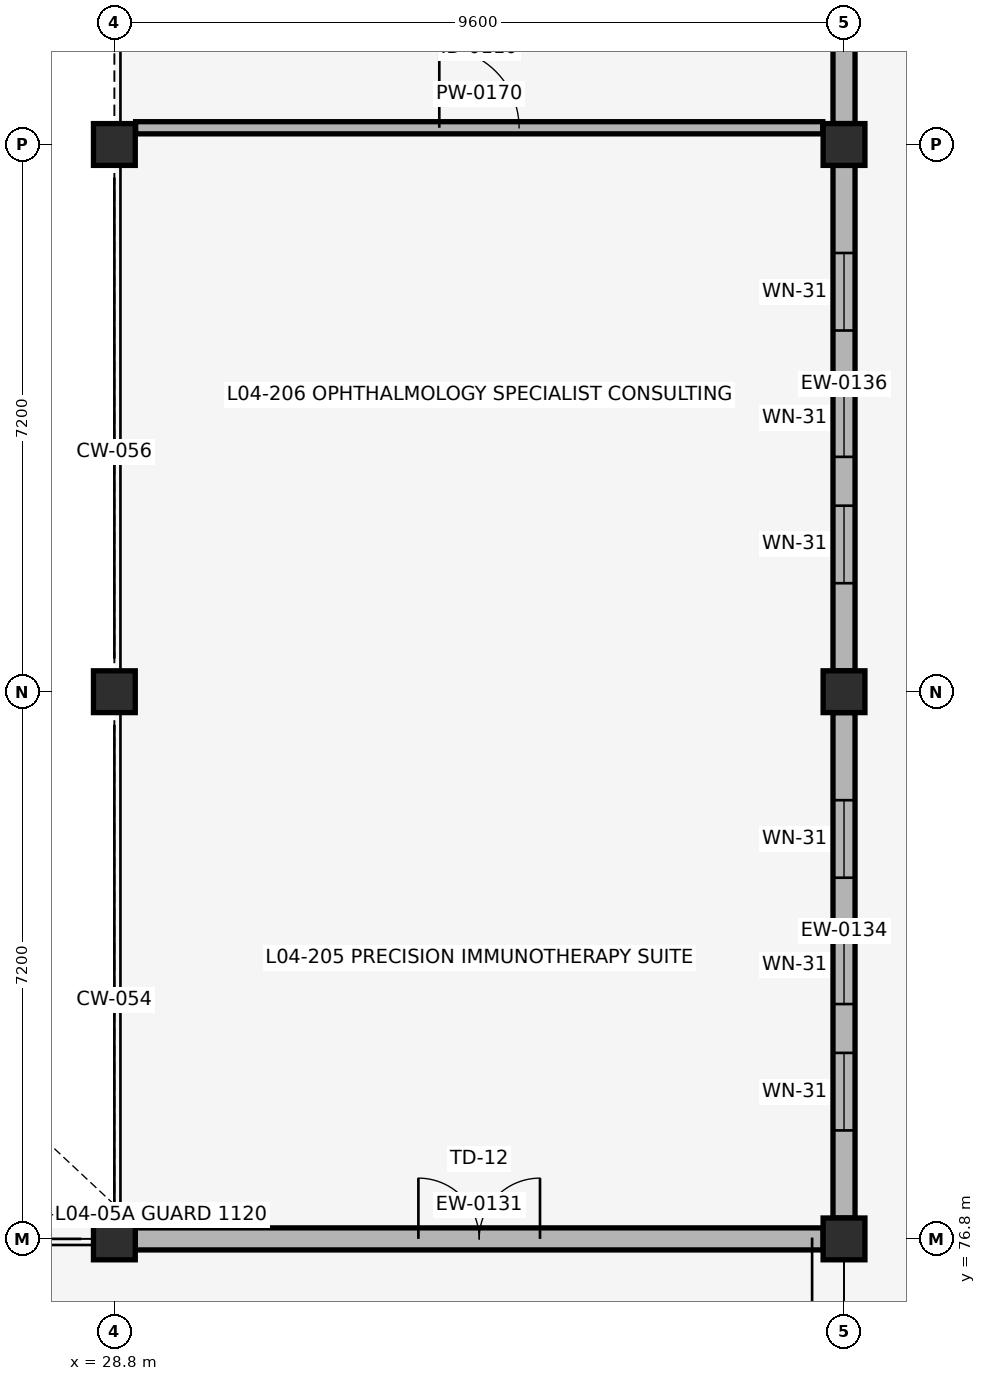
"""IFC4 building model, lengths in metres.
Left out: names, types, materials, properties, quantities, classifications, styles, units other than length and angle.
Written with IfcOpenShell. Run it as: python <this file> out.ifc"""

import sys

from ifc_helpers import new_model, si_unit, direction, frame, frame_2d, origin, origin_2d, place, context, subcontext, project, spatial, rectangle, extrude, element, fill, save


model = new_model("IFC4")
c1 = context("Model", 3, precision=1e-05, world=origin(), true_north=direction((0.0, 1.0)))
c2 = subcontext(c1, "Body", "Model", "MODEL_VIEW")
j1 = project(units=[si_unit("LENGTHUNIT", "METRE"), si_unit("PLANEANGLEUNIT", "RADIAN")], contexts=[c1])
p1 = place(None, origin())
s1 = spatial("IfcSite", under=j1, at=p1, CompositionType="ELEMENT")
p2 = place(p1, origin())
s2 = spatial("IfcBuilding", under=s1, at=p2, CompositionType="ELEMENT")
p3 = place(p2, frame((0.0, 0.0, 16.66)))
s3 = spatial("IfcBuildingStorey", under=s2, at=p3, CompositionType="ELEMENT", Elevation=16.66)
for number, where, z_axis, x_axis in (
    (1, (28.8, 76.8, 0.0), (0.0, 0.0, 1.0), (1.0, 0.0, 0.0)),
    (2, (28.8, 84.0, 0.0), (0.0, 0.0, 1.0), (1.0, 0.0, 0.0)),
    (3, (28.8, 91.2, 0.0), (0.0, 0.0, 1.0), (1.0, 0.0, 0.0)),
    (4, (38.4, 76.8, 0.0), (0.0, 0.0, 1.0), (1.0, 0.0, 0.0)),
    (5, (38.4, 84.0, 0.0), (0.0, 0.0, 1.0), (1.0, 0.0, 0.0)),
    (6, (38.4, 91.2, 0.0), (0.0, 0.0, 1.0), (1.0, 0.0, 0.0)),
):
    element("IfcColumn", number, at=place(p3, frame(where, z_axis=z_axis, x_axis=x_axis)), inside=s3, PredefinedType="COLUMN", context=c2, shape_type="SweptSolid", body=[
        extrude(rectangle(XDim=0.55, YDim=0.55, at=origin_2d()), origin(), (0.0, 0.0, 1.0), 4.08),
    ])
p4 = place(p3, frame((29.075, 76.8, 0.0), z_axis=(0.0, 0.0, 1.0), x_axis=(1.0, 0.0, 0.0)))
e7 = element("IfcWall", 7, at=p4, inside=s3, PredefinedType="SOLIDWALL", context=c2, shape_type="SweptSolid", body=[
    extrude(rectangle(XDim=9.05, YDim=0.29, at=frame_2d((4.525, 0.0))), origin(), (0.0, 0.0, 1.0), 3.08),
])
p5 = place(p4, frame((3.725, 0.0, 0.0)))
e8 = element("IfcOpeningElement", 8, at=p5, cuts=e7, PredefinedType="OPENING", context=c2, shape_type="SweptSolid", body=[
    extrude(rectangle(XDim=1.6, YDim=2.15, at=frame_2d((0.8, 1.075))), frame((0.0, 0.155, 0.0), z_axis=(0.0, -1.0, 0.0), x_axis=(1.0, 0.0, 0.0)), (0.0, 0.0, 1.0), 0.31),
])
p6 = place(p3, frame((38.4, 77.075, 0.0), z_axis=(0.0, 0.0, 1.0), x_axis=(0.0, 1.0, 0.0)))
e9 = element("IfcWall", 9, at=p6, inside=s3, PredefinedType="SOLIDWALL", context=c2, shape_type="SweptSolid", body=[
    extrude(rectangle(XDim=6.65, YDim=0.29, at=frame_2d((3.325, 0.0))), origin(), (0.0, 0.0, 1.0), 3.08),
])
p7 = place(p6, frame((1.153, 0.0, 0.88)))
e10 = element("IfcOpeningElement", 10, at=p7, cuts=e9, PredefinedType="OPENING", context=c2, shape_type="SweptSolid", body=[
    extrude(rectangle(XDim=1.02, YDim=1.88, at=frame_2d((0.51, 0.94))), frame((0.0, 0.155, 0.0), z_axis=(0.0, -1.0, 0.0), x_axis=(1.0, 0.0, 0.0)), (0.0, 0.0, 1.0), 0.31),
])
p8 = place(p6, frame((2.815, 0.0, 0.88)))
e11 = element("IfcOpeningElement", 11, at=p8, cuts=e9, PredefinedType="OPENING", context=c2, shape_type="SweptSolid", body=[
    extrude(rectangle(XDim=1.02, YDim=1.88, at=frame_2d((0.51, 0.94))), frame((0.0, 0.155, 0.0), z_axis=(0.0, -1.0, 0.0), x_axis=(1.0, 0.0, 0.0)), (0.0, 0.0, 1.0), 0.31),
])
p9 = place(p6, frame((4.478, 0.0, 0.88)))
e12 = element("IfcOpeningElement", 12, at=p9, cuts=e9, PredefinedType="OPENING", context=c2, shape_type="SweptSolid", body=[
    extrude(rectangle(XDim=1.02, YDim=1.88, at=frame_2d((0.51, 0.94))), frame((0.0, 0.155, 0.0), z_axis=(0.0, -1.0, 0.0), x_axis=(1.0, 0.0, 0.0)), (0.0, 0.0, 1.0), 0.31),
])
p10 = place(p3, frame((38.4, 84.275, 0.0), z_axis=(0.0, 0.0, 1.0), x_axis=(0.0, 1.0, 0.0)))
e13 = element("IfcWall", 13, at=p10, inside=s3, PredefinedType="SOLIDWALL", context=c2, shape_type="SweptSolid", body=[
    extrude(rectangle(XDim=6.65, YDim=0.29, at=frame_2d((3.325, 0.0))), origin(), (0.0, 0.0, 1.0), 3.08),
])
p11 = place(p10, frame((1.153, 0.0, 0.88)))
e14 = element("IfcOpeningElement", 14, at=p11, cuts=e13, PredefinedType="OPENING", context=c2, shape_type="SweptSolid", body=[
    extrude(rectangle(XDim=1.02, YDim=1.88, at=frame_2d((0.51, 0.94))), frame((0.0, 0.155, 0.0), z_axis=(0.0, -1.0, 0.0), x_axis=(1.0, 0.0, 0.0)), (0.0, 0.0, 1.0), 0.31),
])
p12 = place(p10, frame((2.815, 0.0, 0.88)))
e15 = element("IfcOpeningElement", 15, at=p12, cuts=e13, PredefinedType="OPENING", context=c2, shape_type="SweptSolid", body=[
    extrude(rectangle(XDim=1.02, YDim=1.88, at=frame_2d((0.51, 0.94))), frame((0.0, 0.155, 0.0), z_axis=(0.0, -1.0, 0.0), x_axis=(1.0, 0.0, 0.0)), (0.0, 0.0, 1.0), 0.31),
])
p13 = place(p10, frame((4.478, 0.0, 0.88)))
e16 = element("IfcOpeningElement", 16, at=p13, cuts=e13, PredefinedType="OPENING", context=c2, shape_type="SweptSolid", body=[
    extrude(rectangle(XDim=1.02, YDim=1.88, at=frame_2d((0.51, 0.94))), frame((0.0, 0.155, 0.0), z_axis=(0.0, -1.0, 0.0), x_axis=(1.0, 0.0, 0.0)), (0.0, 0.0, 1.0), 0.31),
])
p14 = place(p3, frame((38.4, 91.475, 0.0), z_axis=(0.0, 0.0, 1.0), x_axis=(0.0, 1.0, 0.0)))
e17 = element("IfcWall", 17, at=p14, inside=s3, PredefinedType="SOLIDWALL", context=c2, shape_type="SweptSolid", body=[
    extrude(rectangle(XDim=6.65, YDim=0.29, at=frame_2d((3.325, 0.0))), origin(), (0.0, 0.0, 1.0), 3.08),
])
p15 = place(p14, frame((1.153, 0.0, 0.88)))
e18 = element("IfcOpeningElement", 18, at=p15, cuts=e17, PredefinedType="OPENING", context=c2, shape_type="SweptSolid", body=[
    extrude(rectangle(XDim=1.02, YDim=1.88, at=frame_2d((0.51, 0.94))), frame((0.0, 0.155, 0.0), z_axis=(0.0, -1.0, 0.0), x_axis=(1.0, 0.0, 0.0)), (0.0, 0.0, 1.0), 0.31),
])
p16 = place(p14, frame((2.815, 0.0, 0.88)))
e19 = element("IfcOpeningElement", 19, at=p16, cuts=e17, PredefinedType="OPENING", context=c2, shape_type="SweptSolid", body=[
    extrude(rectangle(XDim=1.02, YDim=1.88, at=frame_2d((0.51, 0.94))), frame((0.0, 0.155, 0.0), z_axis=(0.0, -1.0, 0.0), x_axis=(1.0, 0.0, 0.0)), (0.0, 0.0, 1.0), 0.31),
])
p17 = place(p14, frame((4.478, 0.0, 0.88)))
e20 = element("IfcOpeningElement", 20, at=p17, cuts=e17, PredefinedType="OPENING", context=c2, shape_type="SweptSolid", body=[
    extrude(rectangle(XDim=1.02, YDim=1.88, at=frame_2d((0.51, 0.94))), frame((0.0, 0.155, 0.0), z_axis=(0.0, -1.0, 0.0), x_axis=(1.0, 0.0, 0.0)), (0.0, 0.0, 1.0), 0.31),
])
p18 = place(p3, frame((29.08, 91.42, 0.0), z_axis=(0.0, 0.0, 1.0), x_axis=(1.0, 0.0, 0.0)))
e21 = element("IfcWall", 21, at=p18, inside=s3, PredefinedType="PARTITIONING", context=c2, shape_type="SweptSolid", body=[
    extrude(rectangle(XDim=9.04, YDim=0.16, at=frame_2d((4.52, 0.0))), origin(), (0.0, 0.0, 1.0), 3.12),
])
p19 = place(p18, frame((3.995, 0.0, 0.0)))
e22 = element("IfcOpeningElement", 22, at=p19, cuts=e21, PredefinedType="OPENING", context=c2, shape_type="SweptSolid", body=[
    extrude(rectangle(XDim=1.05, YDim=2.1, at=frame_2d((0.525, 1.05))), frame((0.0, 0.09, 0.0), z_axis=(0.0, -1.0, 0.0), x_axis=(1.0, 0.0, 0.0)), (0.0, 0.0, 1.0), 0.18),
])
p20 = place(p5, origin())
e23 = element("IfcDoor", 23, at=p20, inside=s3, OperationType="DOUBLE_DOOR_SINGLE_SWING", PredefinedType="DOOR", context=c2, shape_type="SweptSolid", body=[
    extrude(rectangle(XDim=1.6, YDim=2.15, at=frame_2d((0.8, 1.075))), frame((0.0, 0.025, 0.0), z_axis=(0.0, -1.0, 0.0), x_axis=(1.0, 0.0, 0.0)), (0.0, 0.0, 1.0), 0.05),
])
fill(e8, e23)
p21 = place(p7, origin())
e24 = element("IfcWindow", 24, at=p21, inside=s3, PartitioningType="SINGLE_PANEL", PredefinedType="WINDOW", context=c2, shape_type="SweptSolid", body=[
    extrude(rectangle(XDim=1.02, YDim=1.88, at=frame_2d((0.51, 0.94))), frame((0.0, 0.03, 0.0), z_axis=(0.0, -1.0, 0.0), x_axis=(1.0, 0.0, 0.0)), (0.0, 0.0, 1.0), 0.06),
])
fill(e10, e24)
p22 = place(p8, origin())
e25 = element("IfcWindow", 25, at=p22, inside=s3, PartitioningType="SINGLE_PANEL", PredefinedType="WINDOW", context=c2, shape_type="SweptSolid", body=[
    extrude(rectangle(XDim=1.02, YDim=1.88, at=frame_2d((0.51, 0.94))), frame((0.0, 0.03, 0.0), z_axis=(0.0, -1.0, 0.0), x_axis=(1.0, 0.0, 0.0)), (0.0, 0.0, 1.0), 0.06),
])
fill(e11, e25)
p23 = place(p9, origin())
e26 = element("IfcWindow", 26, at=p23, inside=s3, PartitioningType="SINGLE_PANEL", PredefinedType="WINDOW", context=c2, shape_type="SweptSolid", body=[
    extrude(rectangle(XDim=1.02, YDim=1.88, at=frame_2d((0.51, 0.94))), frame((0.0, 0.03, 0.0), z_axis=(0.0, -1.0, 0.0), x_axis=(1.0, 0.0, 0.0)), (0.0, 0.0, 1.0), 0.06),
])
fill(e12, e26)
p24 = place(p11, origin())
e27 = element("IfcWindow", 27, at=p24, inside=s3, PartitioningType="SINGLE_PANEL", PredefinedType="WINDOW", context=c2, shape_type="SweptSolid", body=[
    extrude(rectangle(XDim=1.02, YDim=1.88, at=frame_2d((0.51, 0.94))), frame((0.0, 0.03, 0.0), z_axis=(0.0, -1.0, 0.0), x_axis=(1.0, 0.0, 0.0)), (0.0, 0.0, 1.0), 0.06),
])
fill(e14, e27)
p25 = place(p12, origin())
e28 = element("IfcWindow", 28, at=p25, inside=s3, PartitioningType="SINGLE_PANEL", PredefinedType="WINDOW", context=c2, shape_type="SweptSolid", body=[
    extrude(rectangle(XDim=1.02, YDim=1.88, at=frame_2d((0.51, 0.94))), frame((0.0, 0.03, 0.0), z_axis=(0.0, -1.0, 0.0), x_axis=(1.0, 0.0, 0.0)), (0.0, 0.0, 1.0), 0.06),
])
fill(e15, e28)
p26 = place(p13, origin())
e29 = element("IfcWindow", 29, at=p26, inside=s3, PartitioningType="SINGLE_PANEL", PredefinedType="WINDOW", context=c2, shape_type="SweptSolid", body=[
    extrude(rectangle(XDim=1.02, YDim=1.88, at=frame_2d((0.51, 0.94))), frame((0.0, 0.03, 0.0), z_axis=(0.0, -1.0, 0.0), x_axis=(1.0, 0.0, 0.0)), (0.0, 0.0, 1.0), 0.06),
])
fill(e16, e29)
p27 = place(p19, origin())
e30 = element("IfcDoor", 30, at=p27, inside=s3, OperationType="SINGLE_SWING_LEFT", PredefinedType="DOOR", context=c2, shape_type="SweptSolid", body=[
    extrude(rectangle(XDim=1.05, YDim=2.1, at=frame_2d((0.525, 1.05))), frame((0.0, 0.025, 0.0), z_axis=(0.0, -1.0, 0.0), x_axis=(1.0, 0.0, 0.0)), (0.0, 0.0, 1.0), 0.05),
])
fill(e22, e30)
save(model, sys.argv[1])
